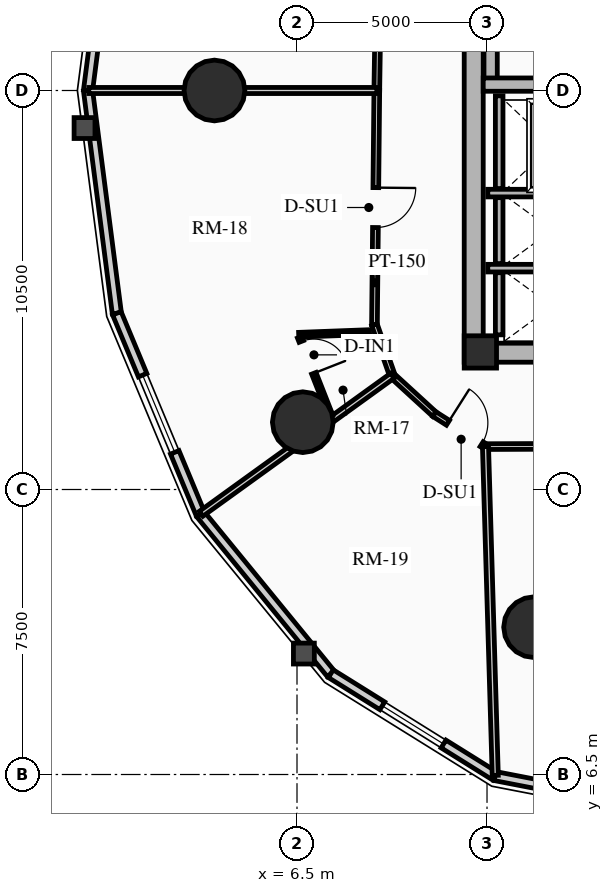
"""IFC4 building model, lengths in metres.
Left out: names, types, materials, properties, quantities, classifications, styles, units other than length and angle.
Written with IfcOpenShell. Run it as: python <this file> out.ifc"""

import sys

from ifc_helpers import new_model, si_unit, direction, frame, frame_2d, origin, origin_2d, place, context, subcontext, project, spatial, rectangle, circle, extrude, source, transform, mapped, element, fill, save


model = new_model("IFC4")
c1 = context("Model", 3, precision=1e-05, world=origin(), true_north=direction((0.0, 1.0)))
c2 = subcontext(c1, "Body", "Model", "MODEL_VIEW")
j1 = project(units=[si_unit("LENGTHUNIT", "METRE"), si_unit("PLANEANGLEUNIT", "RADIAN")], contexts=[c1])
p1 = place(None, origin())
s1 = spatial("IfcSite", under=j1, at=p1, CompositionType="ELEMENT")
p2 = place(p1, origin())
s2 = spatial("IfcBuilding", under=s1, at=p2, CompositionType="ELEMENT")
p3 = place(p2, frame((0.0, 0.0, 36.55)))
s3 = spatial("IfcBuildingStorey", under=s2, at=p3, CompositionType="ELEMENT", Elevation=36.55)
p4 = place(p3, frame((11.15, 17.35, 0.0), z_axis=(0.0, 0.0, 1.0), x_axis=(0.0, 1.0, 0.0)))
e1 = element("IfcWall", 1, at=p4, inside=s3, PredefinedType="SHEAR", context=c2, shape_type="SweptSolid", body=[
    extrude(rectangle(XDim=14.3, YDim=0.5, at=frame_2d((7.15, 0.0))), origin(), (0.0, 0.0, 1.0), 2.91),
])
p5 = place(p3, frame((11.15, 17.6, 0.0), z_axis=(0.0, 0.0, 1.0), x_axis=(1.0, 0.0, 0.0)))
e2 = element("IfcWall", 2, at=p5, inside=s3, PredefinedType="SHEAR", context=c2, shape_type="SweptSolid", body=[
    extrude(rectangle(XDim=10.7, YDim=0.5, at=frame_2d((5.35, 0.0))), origin(), (0.0, 0.0, 1.0), 2.91),
])
m1 = source(origin(), c2, "Body", "SweptSolid", [
    extrude(rectangle(XDim=1.5, YDim=2.02, at=frame_2d((0.75, 1.01))), frame((0.0, 0.26, 0.0), z_axis=(0.0, -1.0, 0.0), x_axis=(1.0, 0.0, 0.0)), (0.0, 0.0, 1.0), 0.52),
])
p6 = place(p5, frame((5.45, 0.0, 0.0)))
e3 = element("IfcOpeningElement", 3, at=p6, cuts=e2, PredefinedType="OPENING", context=c2, shape_type="MappedRepresentation", body=[
    mapped(m1, transform((0.0, 0.0, 0.0), x_axis=(1.0, 0.0, 0.0), y_axis=(0.0, 1.0, 0.0), z_axis=(0.0, 0.0, 1.0), scale=1.0)),
])
p7 = place(p3, frame((11.595, 24.655, 0.0), z_axis=(0.0, 0.0, 1.0), x_axis=(0.0, 1.0, 0.0)))
e4 = element("IfcWall", 4, at=p7, inside=s3, PredefinedType="SHEAR", context=c2, shape_type="SweptSolid", body=[
    extrude(rectangle(XDim=6.745, YDim=0.35, at=frame_2d((3.373, 0.0))), origin(), (0.0, 0.0, 1.0), 2.91),
])
p8 = place(p3, frame((11.4, 24.655, 0.0), z_axis=(0.0, 0.0, 1.0), x_axis=(1.0, 0.0, 0.0)))
e5 = element("IfcWall", 5, at=p8, inside=s3, PredefinedType="SHEAR", context=c2, shape_type="SweptSolid", body=[
    extrude(rectangle(XDim=3.285, YDim=0.35, at=frame_2d((1.643, 0.0))), origin(), (0.0, 0.0, 1.0), 2.91),
])
p9 = place(p3, frame((11.325, 17.62, 0.0), z_axis=(0.0, 0.0, 1.0), x_axis=(1.0, 0.0, 0.0)))
e6 = element("IfcColumn", 6, at=p9, inside=s3, PredefinedType="COLUMN", context=c2, shape_type="SweptSolid", body=[
    extrude(rectangle(XDim=0.85, YDim=0.85, at=origin_2d()), origin(), (0.0, 0.0, 1.0), 2.91),
])
for number, where, z_axis, x_axis in (
    (7, (4.328, 24.5, 0.0), (0.0, 0.0, 1.0), (1.0, 0.0, 0.0)),
    (8, (6.653, 15.771, 0.0), (0.0, 0.0, 1.0), (1.0, 0.0, 0.0)),
    (9, (12.739, 10.377, 0.0), (0.0, 0.0, 1.0), (1.0, 0.0, 0.0)),
):
    element("IfcColumn", number, at=place(p3, frame(where, z_axis=z_axis, x_axis=x_axis)), inside=s3, PredefinedType="USERDEFINED", context=c2, shape_type="SweptSolid", body=[
        extrude(circle(Radius=0.8, at=origin_2d()), origin(), (0.0, 0.0, 1.0), 2.91),
    ])
p10 = place(p3, frame((1.001, 24.5, 0.0), z_axis=(0.0, 0.0, 1.0), x_axis=(0.128329107357, 0.991731637191, 0.0)))
e10 = element("IfcWall", 10, at=p10, inside=s3, PredefinedType="SOLIDWALL", context=c2, shape_type="SweptSolid", body=[
    extrude(rectangle(XDim=5.911, YDim=0.24, at=frame_2d((2.956, 0.0))), origin(), (0.0, 0.0, 1.0), 2.073),
])
m2 = source(origin(), c2, "Body", "SweptSolid", [
    extrude(rectangle(XDim=1.9, YDim=1.35, at=frame_2d((0.95, 0.675))), frame((0.0, 0.13, 0.0), z_axis=(0.0, -1.0, 0.0), x_axis=(1.0, 0.0, 0.0)), (0.0, 0.0, 1.0), 0.26),
])
p11 = place(p10, frame((2.005, 0.0, 0.65)))
e11 = element("IfcOpeningElement", 11, at=p11, cuts=e10, PredefinedType="OPENING", context=c2, shape_type="MappedRepresentation", body=[
    mapped(m2, transform((0.0, 0.0, 0.0), x_axis=(1.0, 0.0, 0.0), y_axis=(0.0, 1.0, 0.0), z_axis=(0.0, 0.0, 1.0), scale=1.0)),
])
p12 = place(p3, frame((1.76, 18.638, 0.0), z_axis=(0.0, 0.0, 1.0), x_axis=(-0.128329107357, 0.991731637191, 0.0)))
e12 = element("IfcWall", 12, at=p12, inside=s3, PredefinedType="SOLIDWALL", context=c2, shape_type="SweptSolid", body=[
    extrude(rectangle(XDim=5.911, YDim=0.24, at=frame_2d((2.956, 0.0))), origin(), (0.0, 0.0, 1.0), 2.073),
])
p13 = place(p3, frame((3.961, 13.35, 0.0), z_axis=(0.0, 0.0, 1.0), x_axis=(-0.38430970593, 0.923204229804, 0.0)))
e13 = element("IfcWall", 13, at=p13, inside=s3, PredefinedType="SOLIDWALL", context=c2, shape_type="SweptSolid", body=[
    extrude(rectangle(XDim=5.728, YDim=0.24, at=frame_2d((2.864, 0.0))), origin(), (0.0, 0.0, 1.0), 2.073),
])
m3 = source(origin(), c2, "Body", "SweptSolid", [
    extrude(rectangle(XDim=2.2, YDim=1.35, at=frame_2d((1.1, 0.675))), frame((0.0, 0.13, 0.0), z_axis=(0.0, -1.0, 0.0), x_axis=(1.0, 0.0, 0.0)), (0.0, 0.0, 1.0), 0.26),
])
p14 = place(p13, frame((1.764, 0.0, 0.65)))
e14 = element("IfcOpeningElement", 14, at=p14, cuts=e13, PredefinedType="OPENING", context=c2, shape_type="MappedRepresentation", body=[
    mapped(m3, transform((0.0, 0.0, 0.0), x_axis=(1.0, 0.0, 0.0), y_axis=(0.0, 1.0, 0.0), z_axis=(0.0, 0.0, 1.0), scale=1.0)),
])
p15 = place(p3, frame((7.39, 9.153, 0.0), z_axis=(0.0, 0.0, 1.0), x_axis=(-0.632710215588, 0.774388651189, 0.0)))
e15 = element("IfcWall", 15, at=p15, inside=s3, PredefinedType="SOLIDWALL", context=c2, shape_type="SweptSolid", body=[
    extrude(rectangle(XDim=5.419, YDim=0.24, at=frame_2d((2.71, 0.0))), origin(), (0.0, 0.0, 1.0), 2.073),
])
p16 = place(p3, frame((11.71, 6.458, 0.0), z_axis=(0.0, 0.0, 1.0), x_axis=(-0.848528534887, 0.529149624853, 0.0)))
e16 = element("IfcWall", 16, at=p16, inside=s3, PredefinedType="SOLIDWALL", context=c2, shape_type="SweptSolid", body=[
    extrude(rectangle(XDim=5.092, YDim=0.24, at=frame_2d((2.546, 0.0))), origin(), (0.0, 0.0, 1.0), 2.073),
])
p17 = place(p16, frame((1.596, 0.0, 0.65)))
e17 = element("IfcOpeningElement", 17, at=p17, cuts=e16, PredefinedType="OPENING", context=c2, shape_type="MappedRepresentation", body=[
    mapped(m2, transform((0.0, 0.0, 0.0), x_axis=(1.0, 0.0, 0.0), y_axis=(0.0, 1.0, 0.0), z_axis=(0.0, 0.0, 1.0), scale=1.0)),
])
p18 = place(p3, frame((16.5, 5.53, 0.0), z_axis=(0.0, 0.0, 1.0), x_axis=(-0.981724094622, 0.190309752872, 0.0)))
e18 = element("IfcWall", 18, at=p18, inside=s3, PredefinedType="SOLIDWALL", context=c2, shape_type="SweptSolid", body=[
    extrude(rectangle(XDim=4.879, YDim=0.24, at=frame_2d((2.439, 0.0))), origin(), (0.0, 0.0, 1.0), 2.073),
])
p19 = place(p18, frame((1.339, 0.0, 0.65)))
e19 = element("IfcOpeningElement", 19, at=p19, cuts=e18, PredefinedType="OPENING", context=c2, shape_type="MappedRepresentation", body=[
    mapped(m3, transform((0.0, 0.0, 0.0), x_axis=(1.0, 0.0, 0.0), y_axis=(0.0, 1.0, 0.0), z_axis=(0.0, 0.0, 1.0), scale=1.0)),
])
p20 = place(p3, frame((11.52, 21.8, 0.0), z_axis=(0.0, 0.0, 1.0), x_axis=(1.0, 0.0, 0.0)))
e20 = element("IfcWall", 20, at=p20, inside=s3, PredefinedType="SHEAR", context=c2, shape_type="SweptSolid", body=[
    extrude(rectangle(XDim=2.97, YDim=0.2, at=frame_2d((1.485, 0.0))), origin(), (0.0, 0.0, 1.0), 2.91),
])
p21 = place(p3, frame((11.82, 21.92, 0.0), z_axis=(0.0, 0.0, 1.0), x_axis=(0.0, 1.0, 0.0)))
e21 = element("IfcWall", 21, at=p21, inside=s3, PredefinedType="SHEAR", context=c2, shape_type="SweptSolid", body=[
    extrude(rectangle(XDim=2.44, YDim=0.2, at=frame_2d((1.22, 0.0))), origin(), (0.0, 0.0, 1.0), 2.91),
])
p22 = place(p3, frame((11.52, 19.825, 0.0), z_axis=(0.0, 0.0, 1.0), x_axis=(1.0, 0.0, 0.0)))
e22 = element("IfcWall", 22, at=p22, inside=s3, PredefinedType="SHEAR", context=c2, shape_type="SweptSolid", body=[
    extrude(rectangle(XDim=2.97, YDim=0.2, at=frame_2d((1.485, 0.0))), origin(), (0.0, 0.0, 1.0), 2.91),
])
p23 = place(p3, frame((11.82, 19.945, 0.0), z_axis=(0.0, 0.0, 1.0), x_axis=(0.0, 1.0, 0.0)))
e23 = element("IfcWall", 23, at=p23, inside=s3, PredefinedType="SHEAR", context=c2, shape_type="SweptSolid", body=[
    extrude(rectangle(XDim=1.735, YDim=0.2, at=frame_2d((0.867, 0.0))), origin(), (0.0, 0.0, 1.0), 2.91),
])
p24 = place(p3, frame((11.82, 18.07, 0.0), z_axis=(0.0, 0.0, 1.0), x_axis=(0.0, 1.0, 0.0)))
e24 = element("IfcWall", 24, at=p24, inside=s3, PredefinedType="SHEAR", context=c2, shape_type="SweptSolid", body=[
    extrude(rectangle(XDim=1.635, YDim=0.2, at=frame_2d((0.817, 0.0))), origin(), (0.0, 0.0, 1.0), 2.91),
])
p25 = place(p3, frame((8.693, 30.544, 0.0), z_axis=(0.0, 0.0, 1.0), x_axis=(-0.015307007986, -0.99988284089, 0.0)))
e25 = element("IfcWall", 25, at=p25, inside=s3, PredefinedType="PARTITIONING", context=c2, shape_type="SweptSolid", body=[
    extrude(rectangle(XDim=6.045, YDim=0.15, at=frame_2d((3.022, 0.0))), origin(), (0.0, 0.0, 1.0), 2.635),
])
m4 = source(origin(), c2, "Body", "SweptSolid", [
    extrude(rectangle(XDim=1.05, YDim=2.015, at=frame_2d((0.525, 1.007))), frame((0.0, 0.085, 0.0), z_axis=(0.0, -1.0, 0.0), x_axis=(1.0, 0.0, 0.0)), (0.0, 0.0, 1.0), 0.17),
])
p26 = place(p25, frame((2.497, 0.0, 0.0)))
e26 = element("IfcOpeningElement", 26, at=p26, cuts=e25, PredefinedType="OPENING", context=c2, shape_type="MappedRepresentation", body=[
    mapped(m4, transform((0.0, 0.0, 0.0), x_axis=(1.0, 0.0, 0.0), y_axis=(0.0, 1.0, 0.0), z_axis=(0.0, 0.0, 1.0), scale=1.0)),
])
p27 = place(p3, frame((8.6, 24.5, 0.0), z_axis=(0.0, 0.0, 1.0), x_axis=(-0.010023665349, -0.999949761805, 0.0)))
e27 = element("IfcWall", 27, at=p27, inside=s3, PredefinedType="PARTITIONING", context=c2, shape_type="SweptSolid", body=[
    extrude(rectangle(XDim=6.162, YDim=0.15, at=frame_2d((3.081, 0.0))), origin(), (0.0, 0.0, 1.0), 2.159),
])
p28 = place(p27, frame((2.556, 0.0, 0.0)))
e28 = element("IfcOpeningElement", 28, at=p28, cuts=e27, PredefinedType="OPENING", context=c2, shape_type="MappedRepresentation", body=[
    mapped(m4, transform((0.0, 0.0, 0.0), x_axis=(1.0, 0.0, 0.0), y_axis=(0.0, 1.0, 0.0), z_axis=(0.0, 0.0, 1.0), scale=1.0)),
])
p29 = place(p3, frame((8.538, 18.338, 0.0), z_axis=(0.0, 0.0, 1.0), x_axis=(0.331358150167, -0.94350504838, 0.0)))
e29 = element("IfcWall", 29, at=p29, inside=s3, PredefinedType="PARTITIONING", context=c2, shape_type="SweptSolid", body=[
    extrude(rectangle(XDim=1.424, YDim=0.15, at=frame_2d((0.712, 0.0))), origin(), (0.0, 0.0, 1.0), 2.205),
])
p30 = place(p3, frame((9.01, 16.994, 0.0), z_axis=(0.0, 0.0, 1.0), x_axis=(0.737701798986, -0.67512669609, 0.0)))
e30 = element("IfcWall", 30, at=p30, inside=s3, PredefinedType="PARTITIONING", context=c2, shape_type="SweptSolid", body=[
    extrude(rectangle(XDim=1.498, YDim=0.15, at=frame_2d((0.749, 0.0))), origin(), (0.0, 0.0, 1.0), 2.159),
])
p31 = place(p3, frame((10.115, 15.983, 0.0), z_axis=(0.0, 0.0, 1.0), x_axis=(0.843995849351, -0.536349705209, 0.0)))
e31 = element("IfcWall", 31, at=p31, inside=s3, PredefinedType="PARTITIONING", context=c2, shape_type="SweptSolid", body=[
    extrude(rectangle(XDim=1.593, YDim=0.15, at=frame_2d((0.796, 0.0))), origin(), (0.0, 0.0, 1.0), 2.205),
])
p32 = place(p31, frame((0.423, 0.0, 0.0)))
e32 = element("IfcOpeningElement", 32, at=p32, cuts=e31, PredefinedType="OPENING", context=c2, shape_type="MappedRepresentation", body=[
    mapped(m4, transform((0.0, 0.0, 0.0), x_axis=(1.0, 0.0, 0.0), y_axis=(0.0, 1.0, 0.0), z_axis=(0.0, 0.0, 1.0), scale=1.0)),
])
p33 = place(p3, frame((11.46, 15.129, 0.0), z_axis=(0.0, 0.0, 1.0), x_axis=(0.999993513287, 0.003601858435, 0.0)))
e33 = element("IfcWall", 33, at=p33, inside=s3, PredefinedType="PARTITIONING", context=c2, shape_type="SweptSolid", body=[
    extrude(rectangle(XDim=3.321, YDim=0.15, at=frame_2d((1.661, 0.0))), origin(), (0.0, 0.0, 1.0), 2.159),
])
p34 = place(p33, frame((1.643, 0.0, 0.0)))
e34 = element("IfcOpeningElement", 34, at=p34, cuts=e33, PredefinedType="OPENING", context=c2, shape_type="MappedRepresentation", body=[
    mapped(m4, transform((0.0, 0.0, 0.0), x_axis=(1.0, 0.0, 0.0), y_axis=(0.0, 1.0, 0.0), z_axis=(0.0, 0.0, 1.0), scale=1.0)),
])
p35 = place(p3, frame((8.6, 24.5, 0.0), z_axis=(0.0, 0.0, 1.0), x_axis=(-1.0, 0.0, 0.0)))
e35 = element("IfcWall", 35, at=p35, inside=s3, PredefinedType="PARTITIONING", context=c2, shape_type="SweptSolid", body=[
    extrude(rectangle(XDim=7.579, YDim=0.16, at=frame_2d((3.79, 0.0))), origin(), (0.0, 0.0, 1.0), 2.073),
])
p36 = place(p3, frame((9.01, 16.994, 0.0), z_axis=(0.0, 0.0, 1.0), x_axis=(-0.810839958558, -0.585267940012, 0.0)))
e36 = element("IfcWall", 36, at=p36, inside=s3, PredefinedType="PARTITIONING", context=c2, shape_type="SweptSolid", body=[
    extrude(rectangle(XDim=6.207, YDim=0.16, at=frame_2d((3.104, 0.0))), origin(), (0.0, 0.0, 1.0), 2.073),
])
p37 = place(p3, frame((11.46, 15.129, 0.0), z_axis=(0.0, 0.0, 1.0), x_axis=(0.029703270067, -0.999558760528, 0.0)))
e37 = element("IfcWall", 37, at=p37, inside=s3, PredefinedType="PARTITIONING", context=c2, shape_type="SweptSolid", body=[
    extrude(rectangle(XDim=8.655, YDim=0.16, at=frame_2d((4.328, 0.0))), origin(), (0.0, 0.0, 1.0), 2.073),
])
p38 = place(p3, frame((8.409, 18.143, 0.0), z_axis=(0.0, 0.0, 1.0), x_axis=(-0.999294242072, -0.037563516369, 0.0)))
e38 = element("IfcWall", 38, at=p38, inside=s3, PredefinedType="PARTITIONING", context=c2, shape_type="SweptSolid", body=[
    extrude(rectangle(XDim=1.865, YDim=0.125, at=frame_2d((0.933, 0.0))), origin(), (0.0, 0.0, 1.0), 2.205),
])
p39 = place(p3, frame((6.57, 18.008, 0.0), z_axis=(0.0, 0.0, 1.0), x_axis=(0.365917141159, -0.930647433675, 0.0)))
e39 = element("IfcWall", 39, at=p39, inside=s3, PredefinedType="PARTITIONING", context=c2, shape_type="SweptSolid", body=[
    extrude(rectangle(XDim=2.225, YDim=0.125, at=frame_2d((1.113, 0.0))), origin(), (0.0, 0.0, 1.0), 2.159),
])
m5 = source(origin(), c2, "Body", "SweptSolid", [
    extrude(rectangle(XDim=0.9, YDim=2.005, at=frame_2d((0.45, 1.002))), frame((0.0, 0.073, 0.0), z_axis=(0.0, -1.0, 0.0), x_axis=(1.0, 0.0, 0.0)), (0.0, 0.0, 1.0), 0.145),
])
p40 = place(p39, frame((0.12, 0.0, 0.0)))
e40 = element("IfcOpeningElement", 40, at=p40, cuts=e39, PredefinedType="OPENING", context=c2, shape_type="MappedRepresentation", body=[
    mapped(m5, transform((0.0, 0.0, 0.0), x_axis=(1.0, 0.0, 0.0), y_axis=(0.0, 1.0, 0.0), z_axis=(0.0, 0.0, 1.0), scale=1.0)),
])
m6 = source(origin(), c2, "Body", "SweptSolid", [
    extrude(rectangle(XDim=2.2, YDim=1.35, at=frame_2d((1.1, 0.675))), frame((0.0, 0.03, 0.0), z_axis=(0.0, -1.0, 0.0), x_axis=(1.0, 0.0, 0.0)), (0.0, 0.0, 1.0), 0.06),
])
p41 = place(p14, origin())
e41 = element("IfcWindow", 41, at=p41, inside=s3, PartitioningType="DOUBLE_PANEL_VERTICAL", PredefinedType="WINDOW", context=c2, shape_type="MappedRepresentation", body=[
    mapped(m6, transform((0.0, 0.0, 0.0), x_axis=(1.0, 0.0, 0.0), y_axis=(0.0, 1.0, 0.0), z_axis=(0.0, 0.0, 1.0), scale=1.0)),
])
fill(e14, e41)
m7 = source(origin(), c2, "Body", "SweptSolid", [
    extrude(rectangle(XDim=1.9, YDim=1.35, at=frame_2d((0.95, 0.675))), frame((0.0, 0.03, 0.0), z_axis=(0.0, -1.0, 0.0), x_axis=(1.0, 0.0, 0.0)), (0.0, 0.0, 1.0), 0.06),
])
p42 = place(p17, origin())
e42 = element("IfcWindow", 42, at=p42, inside=s3, PartitioningType="DOUBLE_PANEL_VERTICAL", PredefinedType="WINDOW", context=c2, shape_type="MappedRepresentation", body=[
    mapped(m7, transform((0.0, 0.0, 0.0), x_axis=(1.0, 0.0, 0.0), y_axis=(0.0, 1.0, 0.0), z_axis=(0.0, 0.0, 1.0), scale=1.0)),
])
fill(e17, e42)
m8 = source(origin(), c2, "Body", "SweptSolid", [
    extrude(rectangle(XDim=1.05, YDim=2.015, at=frame_2d((0.525, 1.007))), frame((0.0, 0.025, 0.0), z_axis=(0.0, -1.0, 0.0), x_axis=(1.0, 0.0, 0.0)), (0.0, 0.0, 1.0), 0.05),
])
p43 = place(p28, origin())
e43 = element("IfcDoor", 43, at=p43, inside=s3, OperationType="SINGLE_SWING_LEFT", PredefinedType="DOOR", context=c2, shape_type="MappedRepresentation", body=[
    mapped(m8, transform((0.0, 0.0, 0.0), x_axis=(1.0, 0.0, 0.0), y_axis=(0.0, 1.0, 0.0), z_axis=(0.0, 0.0, 1.0), scale=1.0)),
])
fill(e28, e43)
m9 = source(origin(), c2, "Body", "SweptSolid", [
    extrude(rectangle(XDim=0.9, YDim=2.005, at=frame_2d((0.45, 1.002))), frame((0.0, 0.025, 0.0), z_axis=(0.0, -1.0, 0.0), x_axis=(1.0, 0.0, 0.0)), (0.0, 0.0, 1.0), 0.05),
])
p44 = place(p40, origin())
e44 = element("IfcDoor", 44, at=p44, inside=s3, OperationType="SINGLE_SWING_RIGHT", PredefinedType="DOOR", context=c2, shape_type="MappedRepresentation", body=[
    mapped(m9, transform((0.0, 0.0, 0.0), x_axis=(1.0, 0.0, 0.0), y_axis=(0.0, 1.0, 0.0), z_axis=(0.0, 0.0, 1.0), scale=1.0)),
])
fill(e40, e44)
p45 = place(p32, origin())
e45 = element("IfcDoor", 45, at=p45, inside=s3, OperationType="SINGLE_SWING_LEFT", PredefinedType="DOOR", context=c2, shape_type="MappedRepresentation", body=[
    mapped(m8, transform((0.0, 0.0, 0.0), x_axis=(1.0, 0.0, 0.0), y_axis=(0.0, 1.0, 0.0), z_axis=(0.0, 0.0, 1.0), scale=1.0)),
])
fill(e32, e45)
save(model, sys.argv[1])
